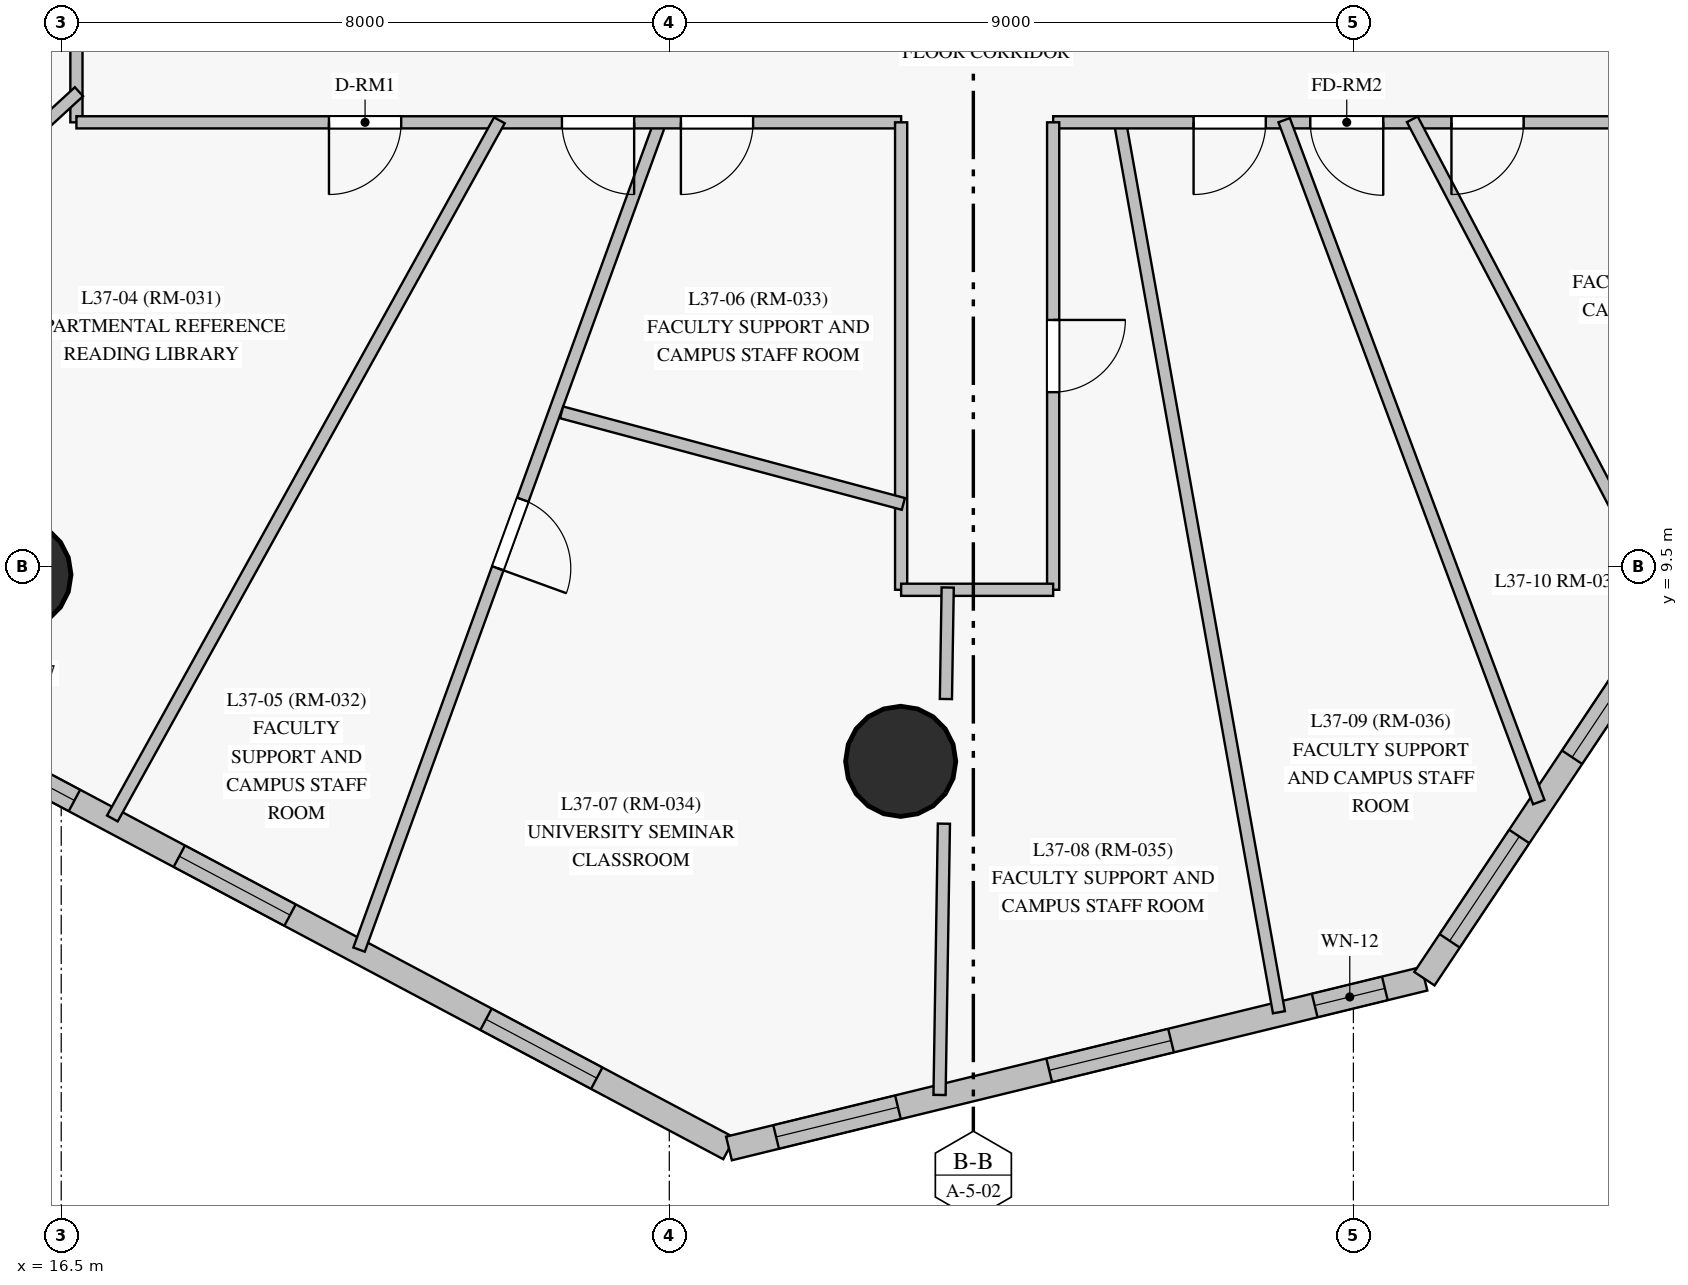
"""IFC4 building model, lengths in metres.
Left out: names, types, materials, properties, quantities, classifications, styles, units other than length and angle.
Written with IfcOpenShell. Run it as: python <this file> out.ifc"""

import sys

from ifc_helpers import new_model, si_unit, direction, frame, frame_2d, origin, origin_with_axes, origin_2d, place, context, subcontext, project, spatial, rectangle, circle, extrude, source, transform, mapped, element, fill, save


model = new_model("IFC4")
c1 = context("Model", 3, precision=1e-05, world=origin(), true_north=direction((0.0, 1.0)))
c2 = subcontext(c1, "Body", "Model", "MODEL_VIEW")
j1 = project(units=[si_unit("LENGTHUNIT", "METRE"), si_unit("PLANEANGLEUNIT", "RADIAN")], contexts=[c1])
p1 = place(None, origin())
s1 = spatial("IfcSite", under=j1, at=p1, CompositionType="ELEMENT")
p2 = place(p1, origin())
s2 = spatial("IfcBuilding", under=s1, at=p2, CompositionType="ELEMENT")
p3 = place(p2, frame((0.0, 0.0, 132.8)))
s3 = spatial("IfcBuildingStorey", under=s2, at=p3, CompositionType="ELEMENT", Elevation=132.8)
m1 = source(origin_with_axes(), c2, "Body", "SweptSolid", [
    extrude(circle(Radius=0.725, at=origin_2d()), origin(), (0.0, 0.0, 1.0), 3.05),
])
for number, where, z_axis, x_axis in (
    (1, (15.904, 9.399, 0.0), (0.0, 0.0, 1.0), (1.0, 0.0, 0.0)),
    (2, (27.544, 6.943, 0.0), (0.0, 0.0, 1.0), (1.0, 0.0, 0.0)),
):
    element("IfcColumn", number, at=place(p3, frame(where, z_axis=z_axis, x_axis=x_axis)), inside=s3, PredefinedType="COLUMN", context=c2, shape_type="MappedRepresentation", body=[
        mapped(m1, transform((0.0, 0.0, 0.0), scale=1.0)),
    ])
p4 = place(p3, frame((14.897, 7.373, 0.0), z_axis=(0.0, 0.0, 1.0), x_axis=(0.882958227075, -0.469451562188, 0.0)))
e3 = element("IfcWall", 3, at=p4, inside=s3, PredefinedType="SOLIDWALL", context=c2, shape_type="SweptSolid", body=[
    extrude(rectangle(XDim=11.765, YDim=0.32, at=frame_2d((5.883, 0.0))), origin(), (0.0, 0.0, 1.0), 2.825),
])
p5 = place(p4, frame((0.613, 0.0, 0.85)))
e4 = element("IfcOpeningElement", 4, at=p5, cuts=e3, PredefinedType="OPENING", context=c2, shape_type="SweptSolid", body=[
    extrude(rectangle(XDim=1.4, YDim=1.65, at=frame_2d((0.7, 0.825))), frame((0.0, 0.17, 0.0), z_axis=(0.0, -1.0, 0.0), x_axis=(1.0, 0.0, 0.0)), (0.0, 0.0, 1.0), 0.34),
])
p6 = place(p4, frame((3.575, 0.0, 0.85)))
e5 = element("IfcOpeningElement", 5, at=p6, cuts=e3, PredefinedType="OPENING", context=c2, shape_type="SweptSolid", body=[
    extrude(rectangle(XDim=1.65, YDim=1.65, at=frame_2d((0.825, 0.825))), frame((0.0, 0.17, 0.0), z_axis=(0.0, -1.0, 0.0), x_axis=(1.0, 0.0, 0.0)), (0.0, 0.0, 1.0), 0.34),
])
p7 = place(p4, frame((8.145, 0.0, 0.85)))
e6 = element("IfcOpeningElement", 6, at=p7, cuts=e3, PredefinedType="OPENING", context=c2, shape_type="SweptSolid", body=[
    extrude(rectangle(XDim=1.65, YDim=1.65, at=frame_2d((0.825, 0.825))), frame((0.0, 0.17, 0.0), z_axis=(0.0, -1.0, 0.0), x_axis=(1.0, 0.0, 0.0)), (0.0, 0.0, 1.0), 0.34),
])
p8 = place(p3, frame((25.285, 1.85, 0.0), z_axis=(0.0, 0.0, 1.0), x_axis=(0.971482920826, 0.237109541233, 0.0)))
e7 = element("IfcWall", 7, at=p8, inside=s3, PredefinedType="SOLIDWALL", context=c2, shape_type="SweptSolid", body=[
    extrude(rectangle(XDim=9.418, YDim=0.32, at=frame_2d((4.709, 0.0))), origin(), (0.0, 0.0, 1.0), 2.825),
])
p9 = place(p8, frame((0.639, 0.0, 0.85)))
e8 = element("IfcOpeningElement", 8, at=p9, cuts=e7, PredefinedType="OPENING", context=c2, shape_type="SweptSolid", body=[
    extrude(rectangle(XDim=1.65, YDim=1.65, at=frame_2d((0.825, 0.825))), frame((0.0, 0.17, 0.0), z_axis=(0.0, -1.0, 0.0), x_axis=(1.0, 0.0, 0.0)), (0.0, 0.0, 1.0), 0.34),
])
p10 = place(p8, frame((4.337, 0.0, 0.85)))
e9 = element("IfcOpeningElement", 9, at=p10, cuts=e7, PredefinedType="OPENING", context=c2, shape_type="SweptSolid", body=[
    extrude(rectangle(XDim=1.65, YDim=1.65, at=frame_2d((0.825, 0.825))), frame((0.0, 0.17, 0.0), z_axis=(0.0, -1.0, 0.0), x_axis=(1.0, 0.0, 0.0)), (0.0, 0.0, 1.0), 0.34),
])
p11 = place(p8, frame((7.932, 0.0, 0.85)))
e10 = element("IfcOpeningElement", 10, at=p11, cuts=e7, PredefinedType="OPENING", context=c2, shape_type="SweptSolid", body=[
    extrude(rectangle(XDim=0.95, YDim=1.5, at=frame_2d((0.475, 0.75))), frame((0.0, 0.17, 0.0), z_axis=(0.0, -1.0, 0.0), x_axis=(1.0, 0.0, 0.0)), (0.0, 0.0, 1.0), 0.34),
])
p12 = place(p3, frame((34.435, 4.083, 0.0), z_axis=(0.0, 0.0, 1.0), x_axis=(0.554696184095, 0.832052969077, 0.0)))
e11 = element("IfcWall", 11, at=p12, inside=s3, PredefinedType="SOLIDWALL", context=c2, shape_type="SweptSolid", body=[
    extrude(rectangle(XDim=14.042, YDim=0.32, at=frame_2d((7.021, 0.0))), origin(), (0.0, 0.0, 1.0), 2.825),
])
p13 = place(p12, frame((0.599, 0.0, 0.85)))
e12 = element("IfcOpeningElement", 12, at=p13, cuts=e11, PredefinedType="OPENING", context=c2, shape_type="SweptSolid", body=[
    extrude(rectangle(XDim=1.65, YDim=1.65, at=frame_2d((0.825, 0.825))), frame((0.0, 0.17, 0.0), z_axis=(0.0, -1.0, 0.0), x_axis=(1.0, 0.0, 0.0)), (0.0, 0.0, 1.0), 0.34),
])
p14 = place(p12, frame((3.502, 0.0, 0.85)))
e13 = element("IfcOpeningElement", 13, at=p14, cuts=e11, PredefinedType="OPENING", context=c2, shape_type="SweptSolid", body=[
    extrude(rectangle(XDim=1.65, YDim=1.65, at=frame_2d((0.825, 0.825))), frame((0.0, 0.17, 0.0), z_axis=(0.0, -1.0, 0.0), x_axis=(1.0, 0.0, 0.0)), (0.0, 0.0, 1.0), 0.34),
])
p15 = place(p12, frame((8.36, 0.0, 0.85)))
e14 = element("IfcOpeningElement", 14, at=p15, cuts=e11, PredefinedType="OPENING", context=c2, shape_type="SweptSolid", body=[
    extrude(rectangle(XDim=1.65, YDim=1.65, at=frame_2d((0.825, 0.825))), frame((0.0, 0.17, 0.0), z_axis=(0.0, -1.0, 0.0), x_axis=(1.0, 0.0, 0.0)), (0.0, 0.0, 1.0), 0.34),
])
p16 = place(p3, frame((16.7, 15.35, 0.0), z_axis=(0.0, 0.0, 1.0), x_axis=(0.0, 1.0, 0.0)))
e15 = element("IfcWall", 15, at=p16, inside=s3, PredefinedType="PARTITIONING", context=c2, shape_type="SweptSolid", body=[
    extrude(rectangle(XDim=22.3, YDim=0.16, at=frame_2d((11.15, 0.0))), origin(), (0.0, 0.0, 1.0), 2.225),
])
p17 = place(p16, frame((10.135, 0.0, 0.0)))
e16 = element("IfcOpeningElement", 16, at=p17, cuts=e15, PredefinedType="OPENING", context=c2, shape_type="SweptSolid", body=[
    extrude(rectangle(XDim=0.96, YDim=2.15, at=frame_2d((0.48, 1.075))), frame((0.0, 0.09, 0.0), z_axis=(0.0, -1.0, 0.0), x_axis=(1.0, 0.0, 0.0)), (0.0, 0.0, 1.0), 0.18),
])
p18 = place(p16, frame((2.104, 0.0, 0.0)))
e17 = element("IfcOpeningElement", 17, at=p18, cuts=e15, PredefinedType="OPENING", context=c2, shape_type="SweptSolid", body=[
    extrude(rectangle(XDim=0.95, YDim=2.15, at=frame_2d((0.475, 1.075))), frame((0.0, 0.09, 0.0), z_axis=(0.0, -1.0, 0.0), x_axis=(1.0, 0.0, 0.0)), (0.0, 0.0, 1.0), 0.18),
])
p19 = place(p16, frame((14.02, 0.0, 0.0)))
e18 = element("IfcOpeningElement", 18, at=p19, cuts=e15, PredefinedType="OPENING", context=c2, shape_type="SweptSolid", body=[
    extrude(rectangle(XDim=0.95, YDim=2.15, at=frame_2d((0.475, 1.075))), frame((0.0, 0.09, 0.0), z_axis=(0.0, -1.0, 0.0), x_axis=(1.0, 0.0, 0.0)), (0.0, 0.0, 1.0), 0.18),
])
p20 = place(p3, frame((30.425, 15.379, 0.0), z_axis=(0.0, 0.0, 1.0), x_axis=(0.175767251586, -0.984431751454, 0.0)))
e19 = element("IfcWall", 19, at=p20, inside=s3, PredefinedType="PARTITIONING", context=c2, shape_type="SweptSolid", body=[
    extrude(rectangle(XDim=11.923, YDim=0.16, at=frame_2d((5.961, 0.0))), origin(), (0.0, 0.0, 1.0), 2.825),
])
p21 = place(p3, frame((24.389, 15.378, 0.0), z_axis=(0.0, 0.0, 1.0), x_axis=(-0.341952384899, -0.93971728007, 0.0)))
e20 = element("IfcWall", 20, at=p21, inside=s3, PredefinedType="PARTITIONING", context=c2, shape_type="SweptSolid", body=[
    extrude(rectangle(XDim=11.612, YDim=0.16, at=frame_2d((5.806, 0.0))), origin(), (0.0, 0.0, 1.0), 2.825),
])
p22 = place(p21, frame((5.313, 0.0, 0.0)))
e21 = element("IfcOpeningElement", 21, at=p22, cuts=e20, PredefinedType="OPENING", context=c2, shape_type="SweptSolid", body=[
    extrude(rectangle(XDim=0.96, YDim=2.15, at=frame_2d((0.48, 1.075))), frame((0.0, 0.09, 0.0), z_axis=(0.0, -1.0, 0.0), x_axis=(1.0, 0.0, 0.0)), (0.0, 0.0, 1.0), 0.18),
])
p23 = place(p3, frame((27.55, 15.35, 0.0), z_axis=(0.0, 0.0, 1.0), x_axis=(-1.0, 0.0, 0.0)))
e22 = element("IfcWall", 22, at=p23, inside=s3, PredefinedType="PARTITIONING", context=c2, shape_type="SweptSolid", body=[
    extrude(rectangle(XDim=10.85, YDim=0.16, at=frame_2d((5.425, 0.0))), origin(), (0.0, 0.0, 1.0), 2.325),
])
p24 = place(p23, frame((6.577, 0.0, 0.0)))
e23 = element("IfcOpeningElement", 23, at=p24, cuts=e22, PredefinedType="OPENING", context=c2, shape_type="SweptSolid", body=[
    extrude(rectangle(XDim=0.95, YDim=2.15, at=frame_2d((0.475, 1.075))), frame((0.0, 0.09, 0.0), z_axis=(0.0, -1.0, 0.0), x_axis=(1.0, 0.0, 0.0)), (0.0, 0.0, 1.0), 0.18),
])
p25 = place(p23, frame((3.512, 0.0, 0.0)))
e24 = element("IfcOpeningElement", 24, at=p25, cuts=e22, PredefinedType="OPENING", context=c2, shape_type="SweptSolid", body=[
    extrude(rectangle(XDim=0.95, YDim=2.15, at=frame_2d((0.475, 1.075))), frame((0.0, 0.09, 0.0), z_axis=(0.0, -1.0, 0.0), x_axis=(1.0, 0.0, 0.0)), (0.0, 0.0, 1.0), 0.18),
])
p26 = place(p23, frame((1.948, 0.0, 0.0)))
e25 = element("IfcOpeningElement", 25, at=p26, cuts=e22, PredefinedType="OPENING", context=c2, shape_type="SweptSolid", body=[
    extrude(rectangle(XDim=0.95, YDim=2.15, at=frame_2d((0.475, 1.075))), frame((0.0, 0.09, 0.0), z_axis=(0.0, -1.0, 0.0), x_axis=(1.0, 0.0, 0.0)), (0.0, 0.0, 1.0), 0.18),
])
p27 = place(p3, frame((40.2, 15.35, 0.0), z_axis=(0.0, 0.0, 1.0), x_axis=(-1.0, 0.0, 0.0)))
e26 = element("IfcWall", 26, at=p27, inside=s3, PredefinedType="PARTITIONING", context=c2, shape_type="SweptSolid", body=[
    extrude(rectangle(XDim=10.65, YDim=0.16, at=frame_2d((5.325, 0.0))), origin(), (0.0, 0.0, 1.0), 2.225),
])
p28 = place(p27, frame((7.853, 0.0, 0.0)))
e27 = element("IfcOpeningElement", 27, at=p28, cuts=e26, PredefinedType="OPENING", context=c2, shape_type="SweptSolid", body=[
    extrude(rectangle(XDim=0.95, YDim=2.15, at=frame_2d((0.475, 1.075))), frame((0.0, 0.09, 0.0), z_axis=(0.0, -1.0, 0.0), x_axis=(1.0, 0.0, 0.0)), (0.0, 0.0, 1.0), 0.18),
])
p29 = place(p27, frame((6.308, 0.0, 0.0)))
e28 = element("IfcOpeningElement", 28, at=p29, cuts=e26, PredefinedType="OPENING", context=c2, shape_type="SweptSolid", body=[
    extrude(rectangle(XDim=0.96, YDim=2.15, at=frame_2d((0.48, 1.075))), frame((0.0, 0.09, 0.0), z_axis=(0.0, -1.0, 0.0), x_axis=(1.0, 0.0, 0.0)), (0.0, 0.0, 1.0), 0.18),
])
p30 = place(p27, frame((4.46, 0.0, 0.0)))
e29 = element("IfcOpeningElement", 29, at=p30, cuts=e26, PredefinedType="OPENING", context=c2, shape_type="SweptSolid", body=[
    extrude(rectangle(XDim=0.95, YDim=2.15, at=frame_2d((0.475, 1.075))), frame((0.0, 0.09, 0.0), z_axis=(0.0, -1.0, 0.0), x_axis=(1.0, 0.0, 0.0)), (0.0, 0.0, 1.0), 0.18),
])
p31 = place(p3, frame((22.265, 15.376, 0.0), z_axis=(0.0, 0.0, 1.0), x_axis=(-0.484869000513, -0.874586789485, 0.0)))
e30 = element("IfcWall", 30, at=p31, inside=s3, PredefinedType="PARTITIONING", context=c2, shape_type="SweptSolid", body=[
    extrude(rectangle(XDim=10.502, YDim=0.16, at=frame_2d((5.251, 0.0))), origin(), (0.0, 0.0, 1.0), 2.825),
])
p32 = place(p3, frame((32.589, 15.378, 0.0), z_axis=(0.0, 0.0, 1.0), x_axis=(0.349793246399, -0.936826923596, 0.0)))
e31 = element("IfcWall", 31, at=p32, inside=s3, PredefinedType="PARTITIONING", context=c2, shape_type="SweptSolid", body=[
    extrude(rectangle(XDim=9.577, YDim=0.16, at=frame_2d((4.788, 0.0))), origin(), (0.0, 0.0, 1.0), 2.825),
])
p33 = place(p3, frame((34.275, 15.39, 0.0), z_axis=(0.0, 0.0, 1.0), x_axis=(0.465452385809, -0.885072921597, 0.0)))
e32 = element("IfcWall", 32, at=p33, inside=s3, PredefinedType="PARTITIONING", context=c2, shape_type="SweptSolid", body=[
    extrude(rectangle(XDim=7.255, YDim=0.16, at=frame_2d((3.627, 0.0))), origin(), (0.0, 0.0, 1.0), 2.825),
])
p34 = place(p3, frame((29.55, 15.35, 0.0), z_axis=(0.0, 0.0, 1.0), x_axis=(0.0, -1.0, 0.0)))
e33 = element("IfcWall", 33, at=p34, inside=s3, PredefinedType="PARTITIONING", context=c2, shape_type="SweptSolid", body=[
    extrude(rectangle(XDim=6.15, YDim=0.16, at=frame_2d((3.075, 0.0))), origin(), (0.0, 0.0, 1.0), 2.825),
])
p35 = place(p34, frame((2.6, 0.0, 0.0)))
e34 = element("IfcOpeningElement", 34, at=p35, cuts=e33, PredefinedType="OPENING", context=c2, shape_type="SweptSolid", body=[
    extrude(rectangle(XDim=0.95, YDim=2.15, at=frame_2d((0.475, 1.075))), frame((0.0, 0.09, 0.0), z_axis=(0.0, -1.0, 0.0), x_axis=(1.0, 0.0, 0.0)), (0.0, 0.0, 1.0), 0.18),
])
p36 = place(p3, frame((27.55, 9.2, 0.0), z_axis=(0.0, 0.0, 1.0), x_axis=(0.0, 1.0, 0.0)))
e35 = element("IfcWall", 35, at=p36, inside=s3, PredefinedType="PARTITIONING", context=c2, shape_type="SweptSolid", body=[
    extrude(rectangle(XDim=6.15, YDim=0.16, at=frame_2d((3.075, 0.0))), origin(), (0.0, 0.0, 1.0), 2.225),
])
p37 = place(p3, frame((16.733, 15.753, 0.0), z_axis=(0.0, 0.0, 1.0), x_axis=(-0.73584309599, -0.677152078992, 0.0)))
e36 = element("IfcWall", 36, at=p37, inside=s3, PredefinedType="PARTITIONING", context=c2, shape_type="SweptSolid", body=[
    extrude(rectangle(XDim=6.144, YDim=0.16, at=frame_2d((3.072, 0.0))), origin(), (0.0, 0.0, 1.0), 2.825),
])
p38 = place(p3, frame((27.579, 10.33, 0.0), z_axis=(0.0, 0.0, 1.0), x_axis=(-0.965933068413, 0.258792015614, 0.0)))
e37 = element("IfcWall", 37, at=p38, inside=s3, PredefinedType="PARTITIONING", context=c2, shape_type="SweptSolid", body=[
    extrude(rectangle(XDim=4.655, YDim=0.16, at=frame_2d((2.327, 0.0))), origin(), (0.0, 0.0, 1.0), 2.825),
])
p39 = place(p3, frame((28.113, 6.123, 0.0), z_axis=(0.0, 0.0, 1.0), x_axis=(-0.016005611237, -0.999871902, 0.0)))
e38 = element("IfcWall", 38, at=p39, inside=s3, PredefinedType="PARTITIONING", context=c2, shape_type="SweptSolid", body=[
    extrude(rectangle(XDim=3.569, YDim=0.16, at=frame_2d((1.785, 0.0))), origin(), (0.0, 0.0, 1.0), 2.825),
])
p40 = place(p3, frame((29.55, 9.2, 0.0), z_axis=(0.0, 0.0, 1.0), x_axis=(-1.0, 0.0, 0.0)))
e39 = element("IfcWall", 39, at=p40, inside=s3, PredefinedType="PARTITIONING", context=c2, shape_type="SweptSolid", body=[
    extrude(rectangle(XDim=2.0, YDim=0.16, at=frame_2d((1.0, 0.0))), origin(), (0.0, 0.0, 1.0), 2.325),
])
p41 = place(p3, frame((28.163, 9.23, 0.0), z_axis=(0.0, 0.0, 1.0), x_axis=(-0.016140350208, -0.999869736063, 0.0)))
e40 = element("IfcWall", 40, at=p41, inside=s3, PredefinedType="PARTITIONING", context=c2, shape_type="SweptSolid", body=[
    extrude(rectangle(XDim=1.467, YDim=0.16, at=frame_2d((0.734, 0.0))), origin(), (0.0, 0.0, 1.0), 2.225),
])
m2 = source(origin_with_axes(), c2, "Body", "SweptSolid", [
    extrude(rectangle(XDim=1.4, YDim=1.65, at=frame_2d((0.7, 0.825))), frame((0.0, 0.03, 0.0), z_axis=(0.0, -1.0, 0.0), x_axis=(1.0, 0.0, 0.0)), (0.0, 0.0, 1.0), 0.06),
])
p42 = place(p5, origin())
e41 = element("IfcWindow", 41, at=p42, inside=s3, PartitioningType="SINGLE_PANEL", PredefinedType="WINDOW", context=c2, shape_type="MappedRepresentation", body=[
    mapped(m2, transform((0.0, 0.0, 0.0), scale=1.0)),
])
fill(e4, e41)
m3 = source(origin_with_axes(), c2, "Body", "SweptSolid", [
    extrude(rectangle(XDim=1.65, YDim=1.65, at=frame_2d((0.825, 0.825))), frame((0.0, 0.03, 0.0), z_axis=(0.0, -1.0, 0.0), x_axis=(1.0, 0.0, 0.0)), (0.0, 0.0, 1.0), 0.06),
])
p43 = place(p6, origin())
e42 = element("IfcWindow", 42, at=p43, inside=s3, PartitioningType="SINGLE_PANEL", PredefinedType="WINDOW", context=c2, shape_type="MappedRepresentation", body=[
    mapped(m3, transform((0.0, 0.0, 0.0), scale=1.0)),
])
fill(e5, e42)
p44 = place(p7, origin())
e43 = element("IfcWindow", 43, at=p44, inside=s3, PartitioningType="SINGLE_PANEL", PredefinedType="WINDOW", context=c2, shape_type="MappedRepresentation", body=[
    mapped(m3, transform((0.0, 0.0, 0.0), scale=1.0)),
])
fill(e6, e43)
p45 = place(p9, origin())
e44 = element("IfcWindow", 44, at=p45, inside=s3, PartitioningType="SINGLE_PANEL", PredefinedType="WINDOW", context=c2, shape_type="MappedRepresentation", body=[
    mapped(m3, transform((0.0, 0.0, 0.0), scale=1.0)),
])
fill(e8, e44)
p46 = place(p10, origin())
e45 = element("IfcWindow", 45, at=p46, inside=s3, PartitioningType="SINGLE_PANEL", PredefinedType="WINDOW", context=c2, shape_type="MappedRepresentation", body=[
    mapped(m3, transform((0.0, 0.0, 0.0), scale=1.0)),
])
fill(e9, e45)
m4 = source(origin_with_axes(), c2, "Body", "SweptSolid", [
    extrude(rectangle(XDim=0.95, YDim=1.5, at=frame_2d((0.475, 0.75))), frame((0.0, 0.03, 0.0), z_axis=(0.0, -1.0, 0.0), x_axis=(1.0, 0.0, 0.0)), (0.0, 0.0, 1.0), 0.06),
])
p47 = place(p11, origin())
e46 = element("IfcWindow", 46, at=p47, inside=s3, PartitioningType="SINGLE_PANEL", PredefinedType="WINDOW", context=c2, shape_type="MappedRepresentation", body=[
    mapped(m4, transform((0.0, 0.0, 0.0), scale=1.0)),
])
fill(e10, e46)
p48 = place(p13, origin())
e47 = element("IfcWindow", 47, at=p48, inside=s3, PartitioningType="SINGLE_PANEL", PredefinedType="WINDOW", context=c2, shape_type="MappedRepresentation", body=[
    mapped(m3, transform((0.0, 0.0, 0.0), scale=1.0)),
])
fill(e12, e47)
p49 = place(p14, origin())
e48 = element("IfcWindow", 48, at=p49, inside=s3, PartitioningType="SINGLE_PANEL", PredefinedType="WINDOW", context=c2, shape_type="MappedRepresentation", body=[
    mapped(m3, transform((0.0, 0.0, 0.0), scale=1.0)),
])
fill(e13, e48)
m5 = source(origin_with_axes(), c2, "Body", "SweptSolid", [
    extrude(rectangle(XDim=0.95, YDim=2.15, at=frame_2d((0.475, 1.075))), frame((0.0, 0.025, 0.0), z_axis=(0.0, -1.0, 0.0), x_axis=(1.0, 0.0, 0.0)), (0.0, 0.0, 1.0), 0.05),
])
p50 = place(p24, origin())
e49 = element("IfcDoor", 49, at=p50, inside=s3, OperationType="SINGLE_SWING_RIGHT", PredefinedType="DOOR", context=c2, shape_type="MappedRepresentation", body=[
    mapped(m5, transform((0.0, 0.0, 0.0), scale=1.0)),
])
fill(e23, e49)
p51 = place(p25, origin())
e50 = element("IfcDoor", 50, at=p51, inside=s3, OperationType="SINGLE_SWING_LEFT", PredefinedType="DOOR", context=c2, shape_type="MappedRepresentation", body=[
    mapped(m5, transform((0.0, 0.0, 0.0), scale=1.0)),
])
fill(e24, e50)
p52 = place(p26, origin())
e51 = element("IfcDoor", 51, at=p52, inside=s3, OperationType="SINGLE_SWING_RIGHT", PredefinedType="DOOR", context=c2, shape_type="MappedRepresentation", body=[
    mapped(m5, transform((0.0, 0.0, 0.0), scale=1.0)),
])
fill(e25, e51)
p53 = place(p35, origin())
e52 = element("IfcDoor", 52, at=p53, inside=s3, OperationType="SINGLE_SWING_LEFT", PredefinedType="DOOR", context=c2, shape_type="MappedRepresentation", body=[
    mapped(m5, transform((0.0, 0.0, 0.0), scale=1.0)),
])
fill(e34, e52)
p54 = place(p28, origin())
e53 = element("IfcDoor", 53, at=p54, inside=s3, OperationType="SINGLE_SWING_RIGHT", PredefinedType="DOOR", context=c2, shape_type="MappedRepresentation", body=[
    mapped(m5, transform((0.0, 0.0, 0.0), scale=1.0)),
])
fill(e27, e53)
m6 = source(origin_with_axes(), c2, "Body", "SweptSolid", [
    extrude(rectangle(XDim=0.96, YDim=2.15, at=frame_2d((0.48, 1.075))), frame((0.0, 0.025, 0.0), z_axis=(0.0, -1.0, 0.0), x_axis=(1.0, 0.0, 0.0)), (0.0, 0.0, 1.0), 0.05),
])
p55 = place(p29, origin())
e54 = element("IfcDoor", 54, at=p55, inside=s3, OperationType="SINGLE_SWING_LEFT", PredefinedType="DOOR", context=c2, shape_type="MappedRepresentation", body=[
    mapped(m6, transform((0.0, 0.0, 0.0), scale=1.0)),
])
fill(e28, e54)
p56 = place(p30, origin())
e55 = element("IfcDoor", 55, at=p56, inside=s3, OperationType="SINGLE_SWING_RIGHT", PredefinedType="DOOR", context=c2, shape_type="MappedRepresentation", body=[
    mapped(m5, transform((0.0, 0.0, 0.0), scale=1.0)),
])
fill(e29, e55)
p57 = place(p22, origin())
e56 = element("IfcDoor", 56, at=p57, inside=s3, OperationType="SINGLE_SWING_RIGHT", PredefinedType="DOOR", context=c2, shape_type="MappedRepresentation", body=[
    mapped(m6, transform((0.0, 0.0, 0.0), scale=1.0)),
])
fill(e21, e56)
save(model, sys.argv[1])
